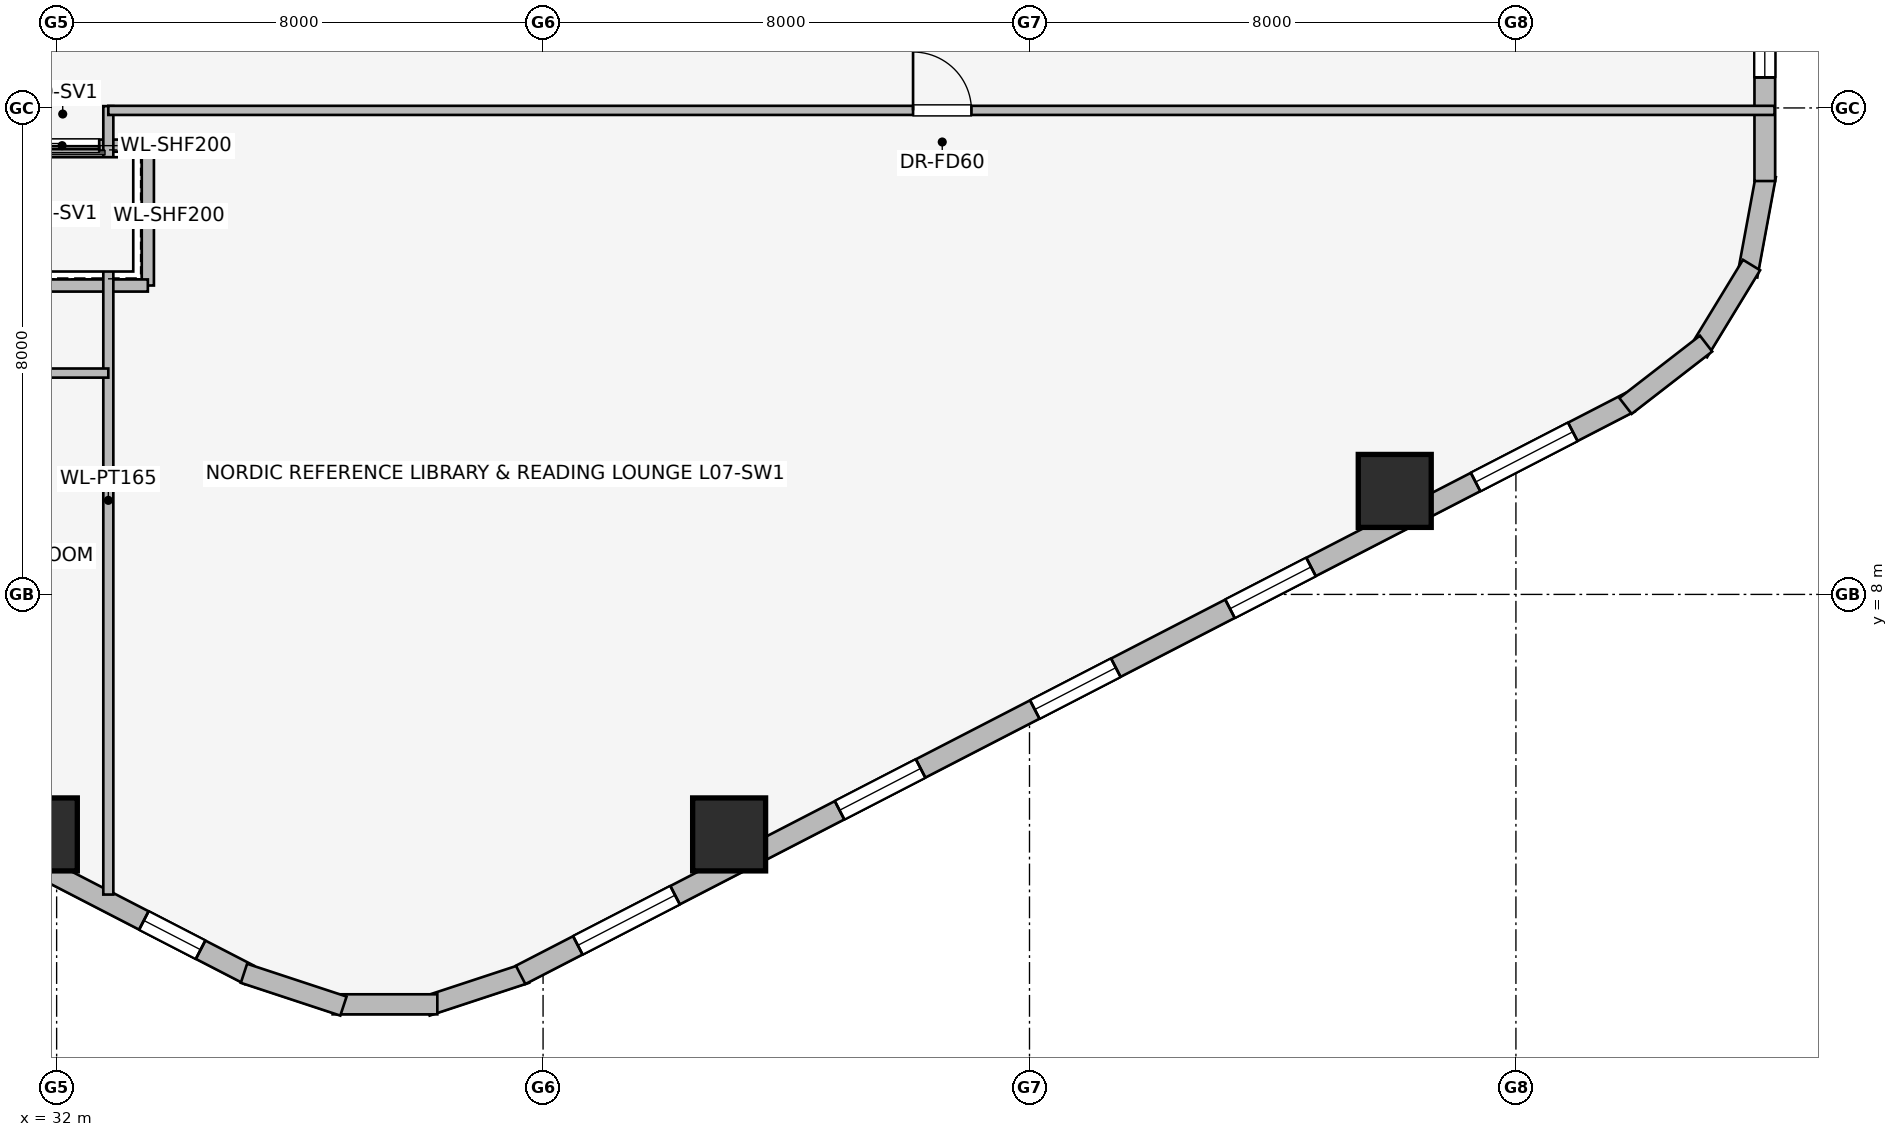
"""IFC4 building model, lengths in metres.
Left out: names, types, materials, properties, quantities, classifications, styles, units other than length and angle.
Written with IfcOpenShell. Run it as: python <this file> out.ifc"""

import sys

from ifc_helpers import new_model, si_unit, direction, frame, frame_2d, origin, origin_2d, place, context, subcontext, project, spatial, rectangle, extrude, element, fill, save


model = new_model("IFC4")
c1 = context("Model", 3, precision=1e-05, world=origin(), true_north=direction((0.0, 1.0)))
c2 = subcontext(c1, "Body", "Model", "MODEL_VIEW")
j1 = project(units=[si_unit("LENGTHUNIT", "METRE"), si_unit("PLANEANGLEUNIT", "RADIAN")], contexts=[c1])
p1 = place(None, origin())
s1 = spatial("IfcSite", under=j1, at=p1, CompositionType="ELEMENT")
p2 = place(p1, origin())
s2 = spatial("IfcBuilding", under=s1, at=p2, CompositionType="ELEMENT")
p3 = place(p2, frame((0.0, 0.0, 30.65)))
s3 = spatial("IfcBuildingStorey", under=s2, at=p3, CompositionType="ELEMENT", Elevation=30.65)
for number, where, z_axis, x_axis in (
    (1, (31.74, 4.053, 0.0), (0.0, 0.0, 1.0), (1.0, 0.0, 0.0)),
    (2, (43.06, 4.053, 0.0), (0.0, 0.0, 1.0), (1.0, 0.0, 0.0)),
    (3, (54.007, 9.702, 0.0), (0.0, 0.0, 1.0), (1.0, 0.0, 0.0)),
):
    element("IfcColumn", number, at=place(p3, frame(where, z_axis=z_axis, x_axis=x_axis)), inside=s3, PredefinedType="COLUMN", context=c2, shape_type="SweptSolid", body=[
        extrude(rectangle(XDim=1.2, YDim=1.2, at=origin_2d()), origin(), (0.0, 0.0, 1.0), 3.65),
    ])
p4 = place(p3, frame((35.169, 1.743, 0.0), z_axis=(0.0, 0.0, 1.0), x_axis=(-0.888634413993, 0.458616264721, 0.0)))
e4 = element("IfcWall", 4, at=p4, inside=s3, PredefinedType="STANDARD", context=c2, shape_type="SweptSolid", body=[
    extrude(rectangle(XDim=20.531, YDim=0.34, at=frame_2d((10.266, 0.0))), origin(), (0.0, 0.0, 1.0), 2.684),
])
p5 = place(p4, frame((0.902, 0.0, 0.75)))
e5 = element("IfcOpeningElement", 5, at=p5, cuts=e4, PredefinedType="OPENING", context=c2, shape_type="SweptSolid", body=[
    extrude(rectangle(XDim=1.05, YDim=1.4, at=frame_2d((0.525, 0.7))), frame((0.0, 0.18, 0.0), z_axis=(0.0, -1.0, 0.0), x_axis=(1.0, 0.0, 0.0)), (0.0, 0.0, 1.0), 0.36),
])
p6 = place(p4, frame((5.903, 0.0, 0.75)))
e6 = element("IfcOpeningElement", 6, at=p6, cuts=e4, PredefinedType="OPENING", context=c2, shape_type="SweptSolid", body=[
    extrude(rectangle(XDim=1.5, YDim=1.5, at=frame_2d((0.75, 0.75))), frame((0.0, 0.18, 0.0), z_axis=(0.0, -1.0, 0.0), x_axis=(1.0, 0.0, 0.0)), (0.0, 0.0, 1.0), 0.36),
])
p7 = place(p4, frame((9.516, 0.0, 0.75)))
e7 = element("IfcOpeningElement", 7, at=p7, cuts=e4, PredefinedType="OPENING", context=c2, shape_type="SweptSolid", body=[
    extrude(rectangle(XDim=1.5, YDim=1.5, at=frame_2d((0.75, 0.75))), frame((0.0, 0.18, 0.0), z_axis=(0.0, -1.0, 0.0), x_axis=(1.0, 0.0, 0.0)), (0.0, 0.0, 1.0), 0.36),
])
p8 = place(p4, frame((13.129, 0.0, 0.75)))
e8 = element("IfcOpeningElement", 8, at=p8, cuts=e4, PredefinedType="OPENING", context=c2, shape_type="SweptSolid", body=[
    extrude(rectangle(XDim=1.5, YDim=1.5, at=frame_2d((0.75, 0.75))), frame((0.0, 0.18, 0.0), z_axis=(0.0, -1.0, 0.0), x_axis=(1.0, 0.0, 0.0)), (0.0, 0.0, 1.0), 0.36),
])
p9 = place(p4, frame((17.673, 0.0, 0.75)))
e9 = element("IfcOpeningElement", 9, at=p9, cuts=e4, PredefinedType="OPENING", context=c2, shape_type="SweptSolid", body=[
    extrude(rectangle(XDim=1.8, YDim=1.5, at=frame_2d((0.9, 0.75))), frame((0.0, 0.18, 0.0), z_axis=(0.0, -1.0, 0.0), x_axis=(1.0, 0.0, 0.0)), (0.0, 0.0, 1.0), 0.36),
])
p10 = place(p3, frame((39.719, 1.769, 0.0), z_axis=(0.0, 0.0, 1.0), x_axis=(-0.94976901097, -0.312951794691, 0.0)))
e10 = element("IfcWall", 10, at=p10, inside=s3, PredefinedType="STANDARD", context=c2, shape_type="SweptSolid", body=[
    extrude(rectangle(XDim=1.722, YDim=0.33, at=frame_2d((0.861, 0.0))), origin(), (0.0, 0.0, 1.0), 3.39),
])
p11 = place(p3, frame((38.261, 1.259, 0.0), z_axis=(0.0, 0.0, 1.0), x_axis=(-1.0, 0.0, 0.0)))
e11 = element("IfcWall", 11, at=p11, inside=s3, PredefinedType="STANDARD", context=c2, shape_type="SweptSolid", body=[
    extrude(rectangle(XDim=1.722, YDim=0.33, at=frame_2d((0.861, 0.0))), origin(), (0.0, 0.0, 1.0), 3.39),
])
p12 = place(p3, frame((36.717, 1.23, 0.0), z_axis=(0.0, 0.0, 1.0), x_axis=(-0.94976901097, 0.312951794691, 0.0)))
e12 = element("IfcWall", 12, at=p12, inside=s3, PredefinedType="STANDARD", context=c2, shape_type="SweptSolid", body=[
    extrude(rectangle(XDim=1.722, YDim=0.33, at=frame_2d((0.861, 0.0))), origin(), (0.0, 0.0, 1.0), 3.39),
])
p13 = place(p3, frame((57.876, 11.159, 0.0), z_axis=(0.0, 0.0, 1.0), x_axis=(-0.888634413993, -0.458616264721, 0.0)))
e13 = element("IfcWall", 13, at=p13, inside=s3, PredefinedType="STANDARD", context=c2, shape_type="SweptSolid", body=[
    extrude(rectangle(XDim=20.531, YDim=0.34, at=frame_2d((10.266, 0.0))), origin(), (0.0, 0.0, 1.0), 2.684),
])
p14 = place(p13, frame((1.058, 0.0, 0.75)))
e14 = element("IfcOpeningElement", 14, at=p14, cuts=e13, PredefinedType="OPENING", context=c2, shape_type="SweptSolid", body=[
    extrude(rectangle(XDim=1.8, YDim=1.5, at=frame_2d((0.9, 0.75))), frame((0.0, 0.18, 0.0), z_axis=(0.0, -1.0, 0.0), x_axis=(1.0, 0.0, 0.0)), (0.0, 0.0, 1.0), 0.36),
])
p15 = place(p13, frame((5.903, 0.0, 0.75)))
e15 = element("IfcOpeningElement", 15, at=p15, cuts=e13, PredefinedType="OPENING", context=c2, shape_type="SweptSolid", body=[
    extrude(rectangle(XDim=1.5, YDim=1.5, at=frame_2d((0.75, 0.75))), frame((0.0, 0.18, 0.0), z_axis=(0.0, -1.0, 0.0), x_axis=(1.0, 0.0, 0.0)), (0.0, 0.0, 1.0), 0.36),
])
p16 = place(p13, frame((9.516, 0.0, 0.75)))
e16 = element("IfcOpeningElement", 16, at=p16, cuts=e13, PredefinedType="OPENING", context=c2, shape_type="SweptSolid", body=[
    extrude(rectangle(XDim=1.5, YDim=1.5, at=frame_2d((0.75, 0.75))), frame((0.0, 0.18, 0.0), z_axis=(0.0, -1.0, 0.0), x_axis=(1.0, 0.0, 0.0)), (0.0, 0.0, 1.0), 0.36),
])
p17 = place(p13, frame((13.129, 0.0, 0.75)))
e17 = element("IfcOpeningElement", 17, at=p17, cuts=e13, PredefinedType="OPENING", context=c2, shape_type="SweptSolid", body=[
    extrude(rectangle(XDim=1.5, YDim=1.5, at=frame_2d((0.75, 0.75))), frame((0.0, 0.18, 0.0), z_axis=(0.0, -1.0, 0.0), x_axis=(1.0, 0.0, 0.0)), (0.0, 0.0, 1.0), 0.36),
])
p18 = place(p13, frame((17.673, 0.0, 0.75)))
e18 = element("IfcOpeningElement", 18, at=p18, cuts=e13, PredefinedType="OPENING", context=c2, shape_type="SweptSolid", body=[
    extrude(rectangle(XDim=1.8, YDim=1.5, at=frame_2d((0.9, 0.75))), frame((0.0, 0.18, 0.0), z_axis=(0.0, -1.0, 0.0), x_axis=(1.0, 0.0, 0.0)), (0.0, 0.0, 1.0), 0.36),
])
p19 = place(p3, frame((60.113, 14.892, 0.0), z_axis=(0.0, 0.0, 1.0), x_axis=(-0.181714143354, -0.983351397063, 0.0)))
e19 = element("IfcWall", 19, at=p19, inside=s3, PredefinedType="STANDARD", context=c2, shape_type="SweptSolid", body=[
    extrude(rectangle(XDim=1.678, YDim=0.33, at=frame_2d((0.839, 0.0))), origin(), (0.0, 0.0, 1.0), 3.39),
])
p20 = place(p3, frame((59.875, 13.417, 0.0), z_axis=(0.0, 0.0, 1.0), x_axis=(-0.520584129191, -0.853810379671, 0.0)))
e20 = element("IfcWall", 20, at=p20, inside=s3, PredefinedType="STANDARD", context=c2, shape_type="SweptSolid", body=[
    extrude(rectangle(XDim=1.677, YDim=0.33, at=frame_2d((0.838, 0.0))), origin(), (0.0, 0.0, 1.0), 3.39),
])
p21 = place(p3, frame((59.127, 12.125, 0.0), z_axis=(0.0, 0.0, 1.0), x_axis=(-0.790691856293, -0.61221433207, 0.0)))
e21 = element("IfcWall", 21, at=p21, inside=s3, PredefinedType="STANDARD", context=c2, shape_type="SweptSolid", body=[
    extrude(rectangle(XDim=1.676, YDim=0.33, at=frame_2d((0.838, 0.0))), origin(), (0.0, 0.0, 1.0), 3.39),
])
p22 = place(p3, frame((60.093, 33.202, 0.0), z_axis=(0.0, 0.0, 1.0), x_axis=(0.0, -1.0, 0.0)))
e22 = element("IfcWall", 22, at=p22, inside=s3, PredefinedType="STANDARD", context=c2, shape_type="SweptSolid", body=[
    extrude(rectangle(XDim=18.404, YDim=0.34, at=frame_2d((9.202, 0.0))), origin(), (0.0, 0.0, 1.0), 2.684),
])
p23 = place(p22, frame((1.744, 0.0, 0.75)))
e23 = element("IfcOpeningElement", 23, at=p23, cuts=e22, PredefinedType="OPENING", context=c2, shape_type="SweptSolid", body=[
    extrude(rectangle(XDim=1.05, YDim=1.4, at=frame_2d((0.525, 0.7))), frame((0.0, 0.18, 0.0), z_axis=(0.0, -1.0, 0.0), x_axis=(1.0, 0.0, 0.0)), (0.0, 0.0, 1.0), 0.36),
])
p24 = place(p22, frame((5.265, 0.0, 0.75)))
e24 = element("IfcOpeningElement", 24, at=p24, cuts=e22, PredefinedType="OPENING", context=c2, shape_type="SweptSolid", body=[
    extrude(rectangle(XDim=1.5, YDim=1.5, at=frame_2d((0.75, 0.75))), frame((0.0, 0.18, 0.0), z_axis=(0.0, -1.0, 0.0), x_axis=(1.0, 0.0, 0.0)), (0.0, 0.0, 1.0), 0.36),
])
p25 = place(p22, frame((8.452, 0.0, 0.75)))
e25 = element("IfcOpeningElement", 25, at=p25, cuts=e22, PredefinedType="OPENING", context=c2, shape_type="SweptSolid", body=[
    extrude(rectangle(XDim=1.5, YDim=1.5, at=frame_2d((0.75, 0.75))), frame((0.0, 0.18, 0.0), z_axis=(0.0, -1.0, 0.0), x_axis=(1.0, 0.0, 0.0)), (0.0, 0.0, 1.0), 0.36),
])
p26 = place(p22, frame((11.639, 0.0, 0.75)))
e26 = element("IfcOpeningElement", 26, at=p26, cuts=e22, PredefinedType="OPENING", context=c2, shape_type="SweptSolid", body=[
    extrude(rectangle(XDim=1.5, YDim=1.5, at=frame_2d((0.75, 0.75))), frame((0.0, 0.18, 0.0), z_axis=(0.0, -1.0, 0.0), x_axis=(1.0, 0.0, 0.0)), (0.0, 0.0, 1.0), 0.36),
])
p27 = place(p22, frame((15.65, 0.0, 0.75)))
e27 = element("IfcOpeningElement", 27, at=p27, cuts=e22, PredefinedType="OPENING", context=c2, shape_type="SweptSolid", body=[
    extrude(rectangle(XDim=1.05, YDim=1.4, at=frame_2d((0.525, 0.7))), frame((0.0, 0.18, 0.0), z_axis=(0.0, -1.0, 0.0), x_axis=(1.0, 0.0, 0.0)), (0.0, 0.0, 1.0), 0.36),
])
p28 = place(p3, frame((33.5, 15.38, 0.0), z_axis=(0.0, 0.0, 1.0), x_axis=(-1.0, 0.0, 0.0)))
e28 = element("IfcWall", 28, at=p28, inside=s3, PredefinedType="PARTITIONING", context=c2, shape_type="SweptSolid", body=[
    extrude(rectangle(XDim=2.82, YDim=0.2, at=frame_2d((1.41, 0.0))), origin(), (0.0, 0.0, 1.0), 3.39),
])
p29 = place(p28, frame((0.8, 0.0, 0.0)))
e29 = element("IfcOpeningElement", 29, at=p29, cuts=e28, PredefinedType="OPENING", context=c2, shape_type="SweptSolid", body=[
    extrude(rectangle(XDim=1.2, YDim=2.2, at=frame_2d((0.6, 1.1))), frame((0.0, 0.11, 0.0), z_axis=(0.0, -1.0, 0.0), x_axis=(1.0, 0.0, 0.0)), (0.0, 0.0, 1.0), 0.22),
])
p30 = place(p3, frame((33.5, 13.08, 0.0), z_axis=(0.0, 0.0, 1.0), x_axis=(0.0, 1.0, 0.0)))
e30 = element("IfcWall", 30, at=p30, inside=s3, PredefinedType="PARTITIONING", context=c2, shape_type="SweptSolid", body=[
    extrude(rectangle(XDim=2.3, YDim=0.2, at=frame_2d((1.15, 0.0))), origin(), (0.0, 0.0, 1.0), 3.39),
])
p31 = place(p3, frame((30.879, 13.08, 0.0), z_axis=(0.0, 0.0, 1.0), x_axis=(1.0, 0.0, 0.0)))
e31 = element("IfcWall", 31, at=p31, inside=s3, PredefinedType="PARTITIONING", context=c2, shape_type="SweptSolid", body=[
    extrude(rectangle(XDim=2.621, YDim=0.2, at=frame_2d((1.311, 0.0))), origin(), (0.0, 0.0, 1.0), 3.39),
])
p32 = place(p3, frame((32.85, 3.064, 0.0), z_axis=(0.0, 0.0, 1.0), x_axis=(0.0, 1.0, 0.0)))
e32 = element("IfcWall", 32, at=p32, inside=s3, PredefinedType="PARTITIONING", context=c2, shape_type="SweptSolid", body=[
    extrude(rectangle(XDim=12.966, YDim=0.165, at=frame_2d((6.483, 0.0))), origin(), (0.0, 0.0, 1.0), 3.39),
])
p33 = place(p3, frame((16.487, 11.64, 0.0), z_axis=(0.0, 0.0, 1.0), x_axis=(1.0, 0.0, 0.0)))
e33 = element("IfcWall", 33, at=p33, inside=s3, PredefinedType="PARTITIONING", context=c2, shape_type="SweptSolid", body=[
    extrude(rectangle(XDim=16.363, YDim=0.15, at=frame_2d((8.182, 0.0))), origin(), (0.0, 0.0, 1.0), 3.39),
])
p34 = place(p33, frame((6.513, 0.0, 0.0)))
e34 = element("IfcOpeningElement", 34, at=p34, cuts=e33, PredefinedType="OPENING", context=c2, shape_type="SweptSolid", body=[
    extrude(rectangle(XDim=0.9, YDim=2.0, at=frame_2d((0.45, 1.0))), frame((0.0, 0.085, 0.0), z_axis=(0.0, -1.0, 0.0), x_axis=(1.0, 0.0, 0.0)), (0.0, 0.0, 1.0), 0.17),
])
p35 = place(p3, frame((32.85, 15.96, 0.0), z_axis=(0.0, 0.0, 1.0), x_axis=(1.0, 0.0, 0.0)))
e35 = element("IfcWall", 35, at=p35, inside=s3, PredefinedType="PARTITIONING", context=c2, shape_type="SweptSolid", body=[
    extrude(rectangle(XDim=27.403, YDim=0.15, at=frame_2d((13.701, 0.0))), origin(), (0.0, 0.0, 1.0), 3.39),
])
p36 = place(p35, frame((13.235, 0.0, 0.0)))
e36 = element("IfcOpeningElement", 36, at=p36, cuts=e35, PredefinedType="OPENING", context=c2, shape_type="SweptSolid", body=[
    extrude(rectangle(XDim=0.96, YDim=2.0, at=frame_2d((0.48, 1.0))), frame((0.0, 0.085, 0.0), z_axis=(0.0, -1.0, 0.0), x_axis=(1.0, 0.0, 0.0)), (0.0, 0.0, 1.0), 0.17),
])
p37 = place(p5, origin())
e37 = element("IfcWindow", 37, at=p37, inside=s3, PartitioningType="SINGLE_PANEL", PredefinedType="WINDOW", context=c2, shape_type="SweptSolid", body=[
    extrude(rectangle(XDim=1.05, YDim=1.4, at=frame_2d((0.525, 0.7))), frame((0.0, 0.03, 0.0), z_axis=(0.0, -1.0, 0.0), x_axis=(1.0, 0.0, 0.0)), (0.0, 0.0, 1.0), 0.06),
])
fill(e5, e37)
p38 = place(p14, origin())
e38 = element("IfcWindow", 38, at=p38, inside=s3, PartitioningType="SINGLE_PANEL", PredefinedType="WINDOW", context=c2, shape_type="SweptSolid", body=[
    extrude(rectangle(XDim=1.8, YDim=1.5, at=frame_2d((0.9, 0.75))), frame((0.0, 0.03, 0.0), z_axis=(0.0, -1.0, 0.0), x_axis=(1.0, 0.0, 0.0)), (0.0, 0.0, 1.0), 0.06),
])
fill(e14, e38)
p39 = place(p15, origin())
e39 = element("IfcWindow", 39, at=p39, inside=s3, PartitioningType="SINGLE_PANEL", PredefinedType="WINDOW", context=c2, shape_type="SweptSolid", body=[
    extrude(rectangle(XDim=1.5, YDim=1.5, at=frame_2d((0.75, 0.75))), frame((0.0, 0.03, 0.0), z_axis=(0.0, -1.0, 0.0), x_axis=(1.0, 0.0, 0.0)), (0.0, 0.0, 1.0), 0.06),
])
fill(e15, e39)
p40 = place(p16, origin())
e40 = element("IfcWindow", 40, at=p40, inside=s3, PartitioningType="SINGLE_PANEL", PredefinedType="WINDOW", context=c2, shape_type="SweptSolid", body=[
    extrude(rectangle(XDim=1.5, YDim=1.5, at=frame_2d((0.75, 0.75))), frame((0.0, 0.03, 0.0), z_axis=(0.0, -1.0, 0.0), x_axis=(1.0, 0.0, 0.0)), (0.0, 0.0, 1.0), 0.06),
])
fill(e16, e40)
p41 = place(p17, origin())
e41 = element("IfcWindow", 41, at=p41, inside=s3, PartitioningType="SINGLE_PANEL", PredefinedType="WINDOW", context=c2, shape_type="SweptSolid", body=[
    extrude(rectangle(XDim=1.5, YDim=1.5, at=frame_2d((0.75, 0.75))), frame((0.0, 0.03, 0.0), z_axis=(0.0, -1.0, 0.0), x_axis=(1.0, 0.0, 0.0)), (0.0, 0.0, 1.0), 0.06),
])
fill(e17, e41)
p42 = place(p18, origin())
e42 = element("IfcWindow", 42, at=p42, inside=s3, PartitioningType="SINGLE_PANEL", PredefinedType="WINDOW", context=c2, shape_type="SweptSolid", body=[
    extrude(rectangle(XDim=1.8, YDim=1.5, at=frame_2d((0.9, 0.75))), frame((0.0, 0.03, 0.0), z_axis=(0.0, -1.0, 0.0), x_axis=(1.0, 0.0, 0.0)), (0.0, 0.0, 1.0), 0.06),
])
fill(e18, e42)
p43 = place(p27, origin())
e43 = element("IfcWindow", 43, at=p43, inside=s3, PartitioningType="SINGLE_PANEL", PredefinedType="WINDOW", context=c2, shape_type="SweptSolid", body=[
    extrude(rectangle(XDim=1.05, YDim=1.4, at=frame_2d((0.525, 0.7))), frame((0.0, 0.03, 0.0), z_axis=(0.0, -1.0, 0.0), x_axis=(1.0, 0.0, 0.0)), (0.0, 0.0, 1.0), 0.06),
])
fill(e27, e43)
p44 = place(p29, origin())
e44 = element("IfcDoor", 44, at=p44, inside=s3, OperationType="SLIDING_TO_RIGHT", PredefinedType="DOOR", context=c2, shape_type="SweptSolid", body=[
    extrude(rectangle(XDim=1.2, YDim=2.2, at=frame_2d((0.6, 1.1))), frame((0.0, 0.025, 0.0), z_axis=(0.0, -1.0, 0.0), x_axis=(1.0, 0.0, 0.0)), (0.0, 0.0, 1.0), 0.05),
])
fill(e29, e44)
p45 = place(p36, origin())
e45 = element("IfcDoor", 45, at=p45, inside=s3, OperationType="SINGLE_SWING_LEFT", PredefinedType="DOOR", context=c2, shape_type="SweptSolid", body=[
    extrude(rectangle(XDim=0.96, YDim=2.0, at=frame_2d((0.48, 1.0))), frame((0.0, 0.025, 0.0), z_axis=(0.0, -1.0, 0.0), x_axis=(1.0, 0.0, 0.0)), (0.0, 0.0, 1.0), 0.05),
])
fill(e36, e45)
save(model, sys.argv[1])
